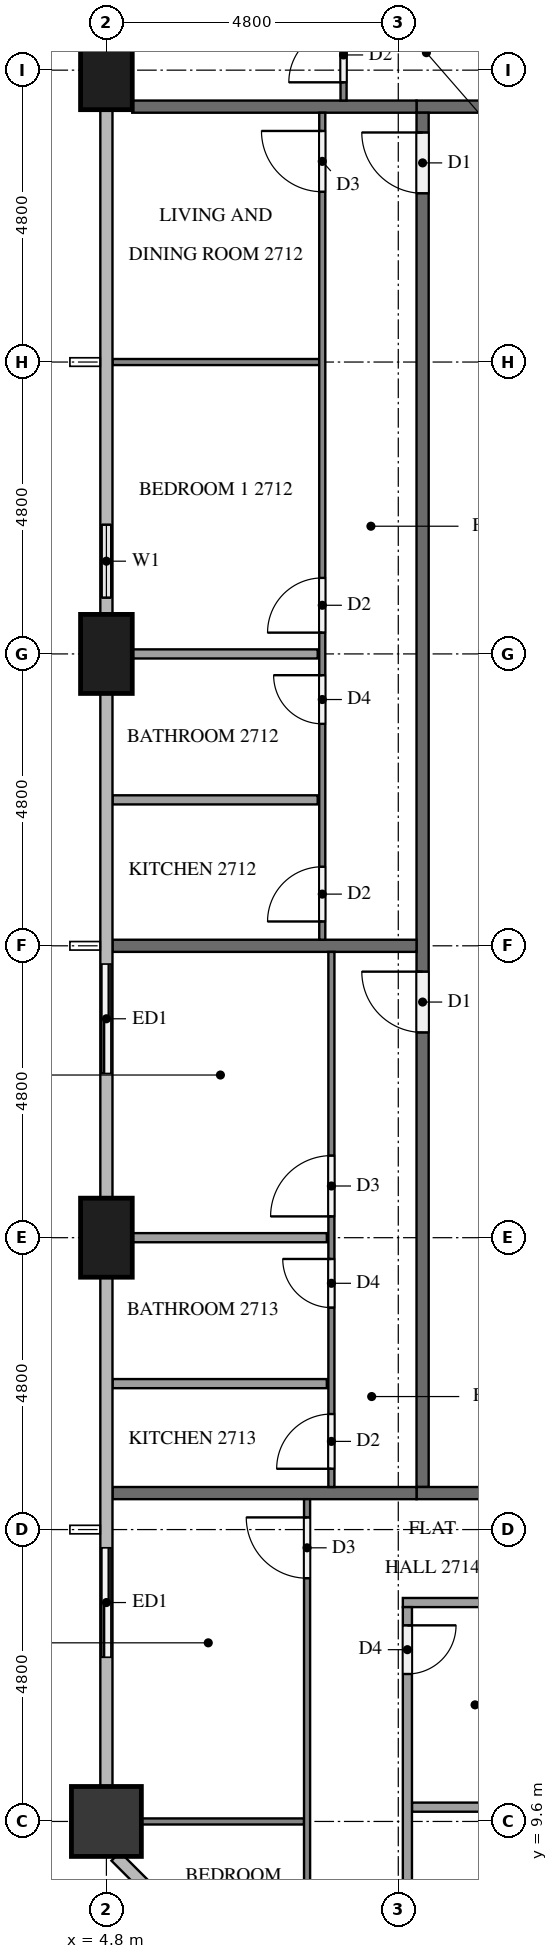
"""IFC4 building model, lengths in metres.
Left out: names, types, materials, properties, quantities, classifications, styles, units other than length and angle.
Written with IfcOpenShell. Run it as: python <this file> out.ifc"""

import sys

from ifc_helpers import new_model, si_unit, direction, frame, frame_2d, origin, origin_2d, place, context, subcontext, project, spatial, rectangle, extrude, element, fill, save


model = new_model("IFC4")
c1 = context("Model", 3, precision=1e-05, world=origin(), true_north=direction((0.0, 1.0)))
c2 = subcontext(c1, "Body", "Model", "MODEL_VIEW")
j1 = project(units=[si_unit("LENGTHUNIT", "METRE"), si_unit("PLANEANGLEUNIT", "RADIAN")], contexts=[c1])
p1 = place(None, origin())
s1 = spatial("IfcSite", under=j1, at=p1, CompositionType="ELEMENT")
p2 = place(p1, origin())
s2 = spatial("IfcBuilding", under=s1, at=p2, CompositionType="ELEMENT")
p3 = place(p2, frame((0.0, 0.0, 106.7)))
s3 = spatial("IfcBuildingStorey", under=s2, at=p3, CompositionType="ELEMENT", Elevation=106.7)
for number, where, z_axis, x_axis in (
    (1, (4.8, 38.4, 0.0), (0.0, 0.0, 1.0), (0.0, 1.0, 0.0)),
    (2, (4.8, 28.8, 0.0), (0.0, 0.0, 1.0), (0.0, 1.0, 0.0)),
    (3, (4.8, 19.2, 0.0), (0.0, 0.0, 1.0), (0.0, 1.0, 0.0)),
):
    element("IfcColumn", number, at=place(p3, frame(where, z_axis=z_axis, x_axis=x_axis)), inside=s3, PredefinedType="COLUMN", context=c2, shape_type="SweptSolid", body=[
        extrude(rectangle(XDim=1.3, YDim=0.85, at=origin_2d()), origin(), (0.0, 0.0, 1.0), 3.2),
    ])
p4 = place(p3, frame((4.8, 9.6, 0.0), z_axis=(0.0, 0.0, 1.0), x_axis=(1.0, 0.0, 0.0)))
e4 = element("IfcColumn", 4, at=p4, inside=s3, PredefinedType="COLUMN", context=c2, shape_type="SweptSolid", body=[
    extrude(rectangle(XDim=1.15, YDim=1.15, at=origin_2d()), origin(), (0.0, 0.0, 1.0), 3.2),
])
p5 = place(p3, frame((4.8, 31.2, 0.0), z_axis=(0.0, 0.0, 1.0), x_axis=(0.0, -1.0, 0.0)))
e5 = element("IfcWall", 5, at=p5, inside=s3, PredefinedType="SOLIDWALL", context=c2, shape_type="SweptSolid", body=[
    extrude(rectangle(XDim=1.75, YDim=0.15, at=frame_2d((0.875, 0.0))), origin(), (0.0, 0.0, 1.0), 3.2),
])
p6 = place(p5, frame((0.275, 0.0, 0.9)))
e6 = element("IfcOpeningElement", 6, at=p6, cuts=e5, PredefinedType="OPENING", context=c2, shape_type="SweptSolid", body=[
    extrude(rectangle(XDim=1.2, YDim=1.4, at=frame_2d((0.6, 0.7))), frame((0.0, 0.085, 0.0), z_axis=(0.0, -1.0, 0.0), x_axis=(1.0, 0.0, 0.0)), (0.0, 0.0, 1.0), 0.17),
])
p7 = place(p3, frame((4.8, 24.0, 0.0), z_axis=(0.0, 0.0, 1.0), x_axis=(0.0, -1.0, 0.0)))
e7 = element("IfcWall", 7, at=p7, inside=s3, PredefinedType="SOLIDWALL", context=c2, shape_type="SweptSolid", body=[
    extrude(rectangle(XDim=2.4, YDim=0.15, at=frame_2d((1.2, 0.0))), origin(), (0.0, 0.0, 1.0), 3.2),
])
p8 = place(p7, frame((0.3, 0.0, 0.0)))
e8 = element("IfcOpeningElement", 8, at=p8, cuts=e7, PredefinedType="OPENING", context=c2, shape_type="SweptSolid", body=[
    extrude(rectangle(XDim=1.8, YDim=2.4, at=frame_2d((0.9, 1.2))), frame((0.0, 0.085, 0.0), z_axis=(0.0, -1.0, 0.0), x_axis=(1.0, 0.0, 0.0)), (0.0, 0.0, 1.0), 0.17),
])
p9 = place(p3, frame((4.8, 14.4, 0.0), z_axis=(0.0, 0.0, 1.0), x_axis=(0.0, -1.0, 0.0)))
e9 = element("IfcWall", 9, at=p9, inside=s3, PredefinedType="SOLIDWALL", context=c2, shape_type="SweptSolid", body=[
    extrude(rectangle(XDim=2.4, YDim=0.15, at=frame_2d((1.2, 0.0))), origin(), (0.0, 0.0, 1.0), 3.2),
])
p10 = place(p9, frame((0.3, 0.0, 0.0)))
e10 = element("IfcOpeningElement", 10, at=p10, cuts=e9, PredefinedType="OPENING", context=c2, shape_type="SweptSolid", body=[
    extrude(rectangle(XDim=1.8, YDim=2.4, at=frame_2d((0.9, 1.2))), frame((0.0, 0.085, 0.0), z_axis=(0.0, -1.0, 0.0), x_axis=(1.0, 0.0, 0.0)), (0.0, 0.0, 1.0), 0.17),
])
p11 = place(p3, frame((12.1, 37.8, 0.0), z_axis=(0.0, 0.0, 1.0), x_axis=(-1.0, 0.0, 0.0)))
e11 = element("IfcWall", 11, at=p11, inside=s3, PredefinedType="PARTITIONING", context=c2, shape_type="SweptSolid", body=[
    extrude(rectangle(XDim=2.2, YDim=0.2, at=frame_2d((1.1, 0.0))), origin(), (0.0, 0.0, 1.0), 3.2),
])
p12 = place(p3, frame((10.0, 15.1, 0.0), z_axis=(0.0, 0.0, 1.0), x_axis=(0.0, 1.0, 0.0)))
e12 = element("IfcWall", 12, at=p12, inside=s3, PredefinedType="PARTITIONING", context=c2, shape_type="SweptSolid", body=[
    extrude(rectangle(XDim=22.6, YDim=0.2, at=frame_2d((11.3, 0.0))), origin(), (0.0, 0.0, 1.0), 3.2),
])
p13 = place(p12, frame((21.275, 0.0, 0.0)))
e13 = element("IfcOpeningElement", 13, at=p13, cuts=e12, PredefinedType="OPENING", context=c2, shape_type="SweptSolid", body=[
    extrude(rectangle(XDim=1.0, YDim=2.1, at=frame_2d((0.5, 1.05))), frame((0.0, 0.11, 0.0), z_axis=(0.0, -1.0, 0.0), x_axis=(1.0, 0.0, 0.0)), (0.0, 0.0, 1.0), 0.22),
])
p14 = place(p12, frame((7.475, 0.0, 0.0)))
e14 = element("IfcOpeningElement", 14, at=p14, cuts=e12, PredefinedType="OPENING", context=c2, shape_type="SweptSolid", body=[
    extrude(rectangle(XDim=1.0, YDim=2.1, at=frame_2d((0.5, 1.05))), frame((0.0, 0.11, 0.0), z_axis=(0.0, -1.0, 0.0), x_axis=(1.0, 0.0, 0.0)), (0.0, 0.0, 1.0), 0.22),
])
p15 = place(p3, frame((9.9, 15.0, 0.0), z_axis=(0.0, 0.0, 1.0), x_axis=(1.0, 0.0, 0.0)))
e15 = element("IfcWall", 15, at=p15, inside=s3, PredefinedType="PARTITIONING", context=c2, shape_type="SweptSolid", body=[
    extrude(rectangle(XDim=2.2, YDim=0.2, at=frame_2d((1.1, 0.0))), origin(), (0.0, 0.0, 1.0), 3.2),
])
p16 = place(p3, frame((5.225, 37.8, 0.0), z_axis=(0.0, 0.0, 1.0), x_axis=(1.0, 0.0, 0.0)))
e16 = element("IfcWall", 16, at=p16, inside=s3, PredefinedType="PARTITIONING", context=c2, shape_type="SweptSolid", body=[
    extrude(rectangle(XDim=4.675, YDim=0.2, at=frame_2d((2.337, 0.0))), origin(), (0.0, 0.0, 1.0), 3.2),
])
for number, where, z_axis, x_axis in (
    (17, (4.9, 24.0, 0.0), (0.0, 0.0, 1.0), (1.0, 0.0, 0.0)),
    (18, (4.9, 15.0, 0.0), (0.0, 0.0, 1.0), (1.0, 0.0, 0.0)),
):
    element("IfcWall", number, at=place(p3, frame(where, z_axis=z_axis, x_axis=x_axis)), inside=s3, PredefinedType="PARTITIONING", context=c2, shape_type="SweptSolid", body=[
        extrude(rectangle(XDim=5.0, YDim=0.2, at=frame_2d((2.5, 0.0))), origin(), (0.0, 0.0, 1.0), 3.2),
    ])
p17 = place(p3, frame((8.7, 37.9, 0.0), z_axis=(0.0, 0.0, 1.0), x_axis=(0.0, 1.0, 0.0)))
e19 = element("IfcWall", 19, at=p17, inside=s3, PredefinedType="PARTITIONING", context=c2, shape_type="SweptSolid", body=[
    extrude(rectangle(XDim=14.559, YDim=0.1, at=frame_2d((7.279, 0.0))), origin(), (0.0, 0.0, 1.0), 3.2),
])
p18 = place(p17, frame((0.3, 0.0, 0.0)))
e20 = element("IfcOpeningElement", 20, at=p18, cuts=e19, PredefinedType="OPENING", context=c2, shape_type="SweptSolid", body=[
    extrude(rectangle(XDim=0.9, YDim=2.1, at=frame_2d((0.45, 1.05))), frame((0.0, 0.06, 0.0), z_axis=(0.0, -1.0, 0.0), x_axis=(1.0, 0.0, 0.0)), (0.0, 0.0, 1.0), 0.12),
])
p19 = place(p17, frame((8.85, 0.0, 0.0)))
e21 = element("IfcOpeningElement", 21, at=p19, cuts=e19, PredefinedType="OPENING", context=c2, shape_type="SweptSolid", body=[
    extrude(rectangle(XDim=0.9, YDim=2.1, at=frame_2d((0.45, 1.05))), frame((0.0, 0.06, 0.0), z_axis=(0.0, -1.0, 0.0), x_axis=(1.0, 0.0, 0.0)), (0.0, 0.0, 1.0), 0.12),
])
p20 = place(p17, frame((10.45, 0.0, 0.0)))
e22 = element("IfcOpeningElement", 22, at=p20, cuts=e19, PredefinedType="OPENING", context=c2, shape_type="SweptSolid", body=[
    extrude(rectangle(XDim=1.0, YDim=2.1, at=frame_2d((0.5, 1.05))), frame((0.0, 0.06, 0.0), z_axis=(0.0, -1.0, 0.0), x_axis=(1.0, 0.0, 0.0)), (0.0, 0.0, 1.0), 0.12),
])
p21 = place(p3, frame((8.3, 33.6, 0.0), z_axis=(0.0, 0.0, 1.0), x_axis=(-1.0, 0.0, 0.0)))
e23 = element("IfcWall", 23, at=p21, inside=s3, PredefinedType="PARTITIONING", context=c2, shape_type="SweptSolid", body=[
    extrude(rectangle(XDim=3.4, YDim=0.1, at=frame_2d((1.7, 0.0))), origin(), (0.0, 0.0, 1.0), 3.2),
])
p22 = place(p3, frame((8.275, 28.8, 0.0), z_axis=(0.0, 0.0, 1.0), x_axis=(-1.0, 0.0, 0.0)))
e24 = element("IfcWall", 24, at=p22, inside=s3, PredefinedType="PARTITIONING", context=c2, shape_type="SweptSolid", body=[
    extrude(rectangle(XDim=3.05, YDim=0.15, at=frame_2d((1.525, 0.0))), origin(), (0.0, 0.0, 1.0), 3.2),
])
p23 = place(p3, frame((8.275, 26.4, 0.0), z_axis=(0.0, 0.0, 1.0), x_axis=(-1.0, 0.0, 0.0)))
e25 = element("IfcWall", 25, at=p23, inside=s3, PredefinedType="PARTITIONING", context=c2, shape_type="SweptSolid", body=[
    extrude(rectangle(XDim=3.375, YDim=0.15, at=frame_2d((1.688, 0.0))), origin(), (0.0, 0.0, 1.0), 3.2),
])
p24 = place(p3, frame((8.35, 24.1, 0.0), z_axis=(0.0, 0.0, 1.0), x_axis=(0.0, 1.0, 0.0)))
e26 = element("IfcWall", 26, at=p24, inside=s3, PredefinedType="PARTITIONING", context=c2, shape_type="SweptSolid", body=[
    extrude(rectangle(XDim=13.6, YDim=0.1, at=frame_2d((6.8, 0.0))), origin(), (0.0, 0.0, 1.0), 3.2),
])
p25 = place(p24, frame((12.3, 0.0, 0.0)))
e27 = element("IfcOpeningElement", 27, at=p25, cuts=e26, PredefinedType="OPENING", context=c2, shape_type="SweptSolid", body=[
    extrude(rectangle(XDim=1.0, YDim=2.1, at=frame_2d((0.5, 1.05))), frame((0.0, 0.06, 0.0), z_axis=(0.0, -1.0, 0.0), x_axis=(1.0, 0.0, 0.0)), (0.0, 0.0, 1.0), 0.12),
])
p26 = place(p24, frame((5.05, 0.0, 0.0)))
e28 = element("IfcOpeningElement", 28, at=p26, cuts=e26, PredefinedType="OPENING", context=c2, shape_type="SweptSolid", body=[
    extrude(rectangle(XDim=0.9, YDim=2.1, at=frame_2d((0.45, 1.05))), frame((0.0, 0.06, 0.0), z_axis=(0.0, -1.0, 0.0), x_axis=(1.0, 0.0, 0.0)), (0.0, 0.0, 1.0), 0.12),
])
p27 = place(p24, frame((3.55, 0.0, 0.0)))
e29 = element("IfcOpeningElement", 29, at=p27, cuts=e26, PredefinedType="OPENING", context=c2, shape_type="SweptSolid", body=[
    extrude(rectangle(XDim=0.8, YDim=2.1, at=frame_2d((0.4, 1.05))), frame((0.0, 0.06, 0.0), z_axis=(0.0, -1.0, 0.0), x_axis=(1.0, 0.0, 0.0)), (0.0, 0.0, 1.0), 0.12),
])
p28 = place(p24, frame((0.3, 0.0, 0.0)))
e30 = element("IfcOpeningElement", 30, at=p28, cuts=e26, PredefinedType="OPENING", context=c2, shape_type="SweptSolid", body=[
    extrude(rectangle(XDim=0.9, YDim=2.1, at=frame_2d((0.45, 1.05))), frame((0.0, 0.06, 0.0), z_axis=(0.0, -1.0, 0.0), x_axis=(1.0, 0.0, 0.0)), (0.0, 0.0, 1.0), 0.12),
])
p29 = place(p3, frame((8.425, 19.2, 0.0), z_axis=(0.0, 0.0, 1.0), x_axis=(-1.0, 0.0, 0.0)))
e31 = element("IfcWall", 31, at=p29, inside=s3, PredefinedType="PARTITIONING", context=c2, shape_type="SweptSolid", body=[
    extrude(rectangle(XDim=3.2, YDim=0.15, at=frame_2d((1.6, 0.0))), origin(), (0.0, 0.0, 1.0), 3.2),
])
p30 = place(p3, frame((8.425, 16.8, 0.0), z_axis=(0.0, 0.0, 1.0), x_axis=(-1.0, 0.0, 0.0)))
e32 = element("IfcWall", 32, at=p30, inside=s3, PredefinedType="PARTITIONING", context=c2, shape_type="SweptSolid", body=[
    extrude(rectangle(XDim=3.525, YDim=0.15, at=frame_2d((1.763, 0.0))), origin(), (0.0, 0.0, 1.0), 3.2),
])
p31 = place(p3, frame((8.5, 15.1, 0.0), z_axis=(0.0, 0.0, 1.0), x_axis=(0.0, 1.0, 0.0)))
e33 = element("IfcWall", 33, at=p31, inside=s3, PredefinedType="PARTITIONING", context=c2, shape_type="SweptSolid", body=[
    extrude(rectangle(XDim=8.8, YDim=0.1, at=frame_2d((4.4, 0.0))), origin(), (0.0, 0.0, 1.0), 3.2),
])
p32 = place(p31, frame((4.45, 0.0, 0.0)))
e34 = element("IfcOpeningElement", 34, at=p32, cuts=e33, PredefinedType="OPENING", context=c2, shape_type="SweptSolid", body=[
    extrude(rectangle(XDim=1.0, YDim=2.1, at=frame_2d((0.5, 1.05))), frame((0.0, 0.06, 0.0), z_axis=(0.0, -1.0, 0.0), x_axis=(1.0, 0.0, 0.0)), (0.0, 0.0, 1.0), 0.12),
])
p33 = place(p31, frame((2.95, 0.0, 0.0)))
e35 = element("IfcOpeningElement", 35, at=p33, cuts=e33, PredefinedType="OPENING", context=c2, shape_type="SweptSolid", body=[
    extrude(rectangle(XDim=0.8, YDim=2.1, at=frame_2d((0.4, 1.05))), frame((0.0, 0.06, 0.0), z_axis=(0.0, -1.0, 0.0), x_axis=(1.0, 0.0, 0.0)), (0.0, 0.0, 1.0), 0.12),
])
p34 = place(p31, frame((0.3, 0.0, 0.0)))
e36 = element("IfcOpeningElement", 36, at=p34, cuts=e33, PredefinedType="OPENING", context=c2, shape_type="SweptSolid", body=[
    extrude(rectangle(XDim=0.9, YDim=2.1, at=frame_2d((0.45, 1.05))), frame((0.0, 0.06, 0.0), z_axis=(0.0, -1.0, 0.0), x_axis=(1.0, 0.0, 0.0)), (0.0, 0.0, 1.0), 0.12),
])
p35 = place(p3, frame((8.05, 9.6, 0.0), z_axis=(0.0, 0.0, 1.0), x_axis=(-1.0, 0.0, 0.0)))
e37 = element("IfcWall", 37, at=p35, inside=s3, PredefinedType="PARTITIONING", context=c2, shape_type="SweptSolid", body=[
    extrude(rectangle(XDim=2.675, YDim=0.1, at=frame_2d((1.337, 0.0))), origin(), (0.0, 0.0, 1.0), 3.2),
])
p36 = place(p3, frame((8.1, 5.302, 0.0), z_axis=(0.0, 0.0, 1.0), x_axis=(0.0, 1.0, 0.0)))
e38 = element("IfcWall", 38, at=p36, inside=s3, PredefinedType="PARTITIONING", context=c2, shape_type="SweptSolid", body=[
    extrude(rectangle(XDim=9.598, YDim=0.1, at=frame_2d((4.799, 0.0))), origin(), (0.0, 0.0, 1.0), 3.2),
])
p37 = place(p36, frame((8.298, 0.0, 0.0)))
e39 = element("IfcOpeningElement", 39, at=p37, cuts=e38, PredefinedType="OPENING", context=c2, shape_type="SweptSolid", body=[
    extrude(rectangle(XDim=1.0, YDim=2.1, at=frame_2d((0.5, 1.05))), frame((0.0, 0.06, 0.0), z_axis=(0.0, -1.0, 0.0), x_axis=(1.0, 0.0, 0.0)), (0.0, 0.0, 1.0), 0.12),
])
p38 = place(p36, frame((0.3, 0.0, 0.0)))
e40 = element("IfcOpeningElement", 40, at=p38, cuts=e38, PredefinedType="OPENING", context=c2, shape_type="SweptSolid", body=[
    extrude(rectangle(XDim=0.9, YDim=2.1, at=frame_2d((0.45, 1.05))), frame((0.0, 0.06, 0.0), z_axis=(0.0, -1.0, 0.0), x_axis=(1.0, 0.0, 0.0)), (0.0, 0.0, 1.0), 0.12),
])
p39 = place(p3, frame((11.9, 9.835, 0.0), z_axis=(0.0, 0.0, 1.0), x_axis=(-1.0, 0.0, 0.0)))
e41 = element("IfcWall", 41, at=p39, inside=s3, PredefinedType="PARTITIONING", context=c2, shape_type="SweptSolid", body=[
    extrude(rectangle(XDim=2.075, YDim=0.15, at=frame_2d((1.038, 0.0))), origin(), (0.0, 0.0, 1.0), 3.2),
])
p40 = place(p3, frame((11.9, 13.2, 0.0), z_axis=(0.0, 0.0, 1.0), x_axis=(-1.0, 0.0, 0.0)))
e42 = element("IfcWall", 42, at=p40, inside=s3, PredefinedType="PARTITIONING", context=c2, shape_type="SweptSolid", body=[
    extrude(rectangle(XDim=2.225, YDim=0.15, at=frame_2d((1.112, 0.0))), origin(), (0.0, 0.0, 1.0), 3.2),
])
p41 = place(p3, frame((9.75, 13.125, 0.0), z_axis=(0.0, 0.0, 1.0), x_axis=(0.0, -1.0, 0.0)))
e43 = element("IfcWall", 43, at=p41, inside=s3, PredefinedType="PARTITIONING", context=c2, shape_type="SweptSolid", body=[
    extrude(rectangle(XDim=7.75, YDim=0.15, at=frame_2d((3.875, 0.0))), origin(), (0.0, 0.0, 1.0), 3.2),
])
p42 = place(p41, frame((0.3, 0.0, 0.0)))
e44 = element("IfcOpeningElement", 44, at=p42, cuts=e43, PredefinedType="OPENING", context=c2, shape_type="SweptSolid", body=[
    extrude(rectangle(XDim=0.8, YDim=2.1, at=frame_2d((0.4, 1.05))), frame((0.0, 0.085, 0.0), z_axis=(0.0, -1.0, 0.0), x_axis=(1.0, 0.0, 0.0)), (0.0, 0.0, 1.0), 0.17),
])
p43 = place(p41, frame((6.55, 0.0, 0.0)))
e45 = element("IfcOpeningElement", 45, at=p43, cuts=e43, PredefinedType="OPENING", context=c2, shape_type="SweptSolid", body=[
    extrude(rectangle(XDim=0.9, YDim=2.1, at=frame_2d((0.45, 1.05))), frame((0.0, 0.085, 0.0), z_axis=(0.0, -1.0, 0.0), x_axis=(1.0, 0.0, 0.0)), (0.0, 0.0, 1.0), 0.17),
])
p44 = place(p6, origin())
e46 = element("IfcWindow", 46, at=p44, inside=s3, PartitioningType="SINGLE_PANEL", PredefinedType="WINDOW", context=c2, shape_type="SweptSolid", body=[
    extrude(rectangle(XDim=1.2, YDim=1.4, at=frame_2d((0.6, 0.7))), frame((0.0, 0.03, 0.0), z_axis=(0.0, -1.0, 0.0), x_axis=(1.0, 0.0, 0.0)), (0.0, 0.0, 1.0), 0.06),
])
fill(e6, e46)
p45 = place(p8, origin())
e47 = element("IfcDoor", 47, at=p45, inside=s3, OperationType="SLIDING_TO_LEFT", PredefinedType="DOOR", context=c2, shape_type="SweptSolid", body=[
    extrude(rectangle(XDim=1.8, YDim=2.4, at=frame_2d((0.9, 1.2))), frame((0.0, 0.025, 0.0), z_axis=(0.0, -1.0, 0.0), x_axis=(1.0, 0.0, 0.0)), (0.0, 0.0, 1.0), 0.05),
])
fill(e8, e47)
p46 = place(p10, origin())
e48 = element("IfcDoor", 48, at=p46, inside=s3, OperationType="SLIDING_TO_RIGHT", PredefinedType="DOOR", context=c2, shape_type="SweptSolid", body=[
    extrude(rectangle(XDim=1.8, YDim=2.4, at=frame_2d((0.9, 1.2))), frame((0.0, 0.025, 0.0), z_axis=(0.0, -1.0, 0.0), x_axis=(1.0, 0.0, 0.0)), (0.0, 0.0, 1.0), 0.05),
])
fill(e10, e48)
p47 = place(p13, origin())
e49 = element("IfcDoor", 49, at=p47, inside=s3, OperationType="SINGLE_SWING_RIGHT", PredefinedType="DOOR", context=c2, shape_type="SweptSolid", body=[
    extrude(rectangle(XDim=1.0, YDim=2.1, at=frame_2d((0.5, 1.05))), frame((0.0, 0.025, 0.0), z_axis=(0.0, -1.0, 0.0), x_axis=(1.0, 0.0, 0.0)), (0.0, 0.0, 1.0), 0.05),
])
fill(e13, e49)
p48 = place(p14, origin())
e50 = element("IfcDoor", 50, at=p48, inside=s3, OperationType="SINGLE_SWING_RIGHT", PredefinedType="DOOR", context=c2, shape_type="SweptSolid", body=[
    extrude(rectangle(XDim=1.0, YDim=2.1, at=frame_2d((0.5, 1.05))), frame((0.0, 0.025, 0.0), z_axis=(0.0, -1.0, 0.0), x_axis=(1.0, 0.0, 0.0)), (0.0, 0.0, 1.0), 0.05),
])
fill(e14, e50)
p49 = place(p18, origin())
e51 = element("IfcDoor", 51, at=p49, inside=s3, OperationType="SINGLE_SWING_LEFT", PredefinedType="DOOR", context=c2, shape_type="SweptSolid", body=[
    extrude(rectangle(XDim=0.9, YDim=2.1, at=frame_2d((0.45, 1.05))), frame((0.0, 0.025, 0.0), z_axis=(0.0, -1.0, 0.0), x_axis=(1.0, 0.0, 0.0)), (0.0, 0.0, 1.0), 0.05),
])
fill(e20, e51)
p50 = place(p25, origin())
e52 = element("IfcDoor", 52, at=p50, inside=s3, OperationType="SINGLE_SWING_RIGHT", PredefinedType="DOOR", context=c2, shape_type="SweptSolid", body=[
    extrude(rectangle(XDim=1.0, YDim=2.1, at=frame_2d((0.5, 1.05))), frame((0.0, 0.025, 0.0), z_axis=(0.0, -1.0, 0.0), x_axis=(1.0, 0.0, 0.0)), (0.0, 0.0, 1.0), 0.05),
])
fill(e27, e52)
p51 = place(p26, origin())
e53 = element("IfcDoor", 53, at=p51, inside=s3, OperationType="SINGLE_SWING_LEFT", PredefinedType="DOOR", context=c2, shape_type="SweptSolid", body=[
    extrude(rectangle(XDim=0.9, YDim=2.1, at=frame_2d((0.45, 1.05))), frame((0.0, 0.025, 0.0), z_axis=(0.0, -1.0, 0.0), x_axis=(1.0, 0.0, 0.0)), (0.0, 0.0, 1.0), 0.05),
])
fill(e28, e53)
p52 = place(p27, origin())
e54 = element("IfcDoor", 54, at=p52, inside=s3, OperationType="SINGLE_SWING_RIGHT", PredefinedType="DOOR", context=c2, shape_type="SweptSolid", body=[
    extrude(rectangle(XDim=0.8, YDim=2.1, at=frame_2d((0.4, 1.05))), frame((0.0, 0.025, 0.0), z_axis=(0.0, -1.0, 0.0), x_axis=(1.0, 0.0, 0.0)), (0.0, 0.0, 1.0), 0.05),
])
fill(e29, e54)
p53 = place(p28, origin())
e55 = element("IfcDoor", 55, at=p53, inside=s3, OperationType="SINGLE_SWING_LEFT", PredefinedType="DOOR", context=c2, shape_type="SweptSolid", body=[
    extrude(rectangle(XDim=0.9, YDim=2.1, at=frame_2d((0.45, 1.05))), frame((0.0, 0.025, 0.0), z_axis=(0.0, -1.0, 0.0), x_axis=(1.0, 0.0, 0.0)), (0.0, 0.0, 1.0), 0.05),
])
fill(e30, e55)
p54 = place(p32, origin())
e56 = element("IfcDoor", 56, at=p54, inside=s3, OperationType="SINGLE_SWING_LEFT", PredefinedType="DOOR", context=c2, shape_type="SweptSolid", body=[
    extrude(rectangle(XDim=1.0, YDim=2.1, at=frame_2d((0.5, 1.05))), frame((0.0, 0.025, 0.0), z_axis=(0.0, -1.0, 0.0), x_axis=(1.0, 0.0, 0.0)), (0.0, 0.0, 1.0), 0.05),
])
fill(e34, e56)
p55 = place(p33, origin())
e57 = element("IfcDoor", 57, at=p55, inside=s3, OperationType="SINGLE_SWING_RIGHT", PredefinedType="DOOR", context=c2, shape_type="SweptSolid", body=[
    extrude(rectangle(XDim=0.8, YDim=2.1, at=frame_2d((0.4, 1.05))), frame((0.0, 0.025, 0.0), z_axis=(0.0, -1.0, 0.0), x_axis=(1.0, 0.0, 0.0)), (0.0, 0.0, 1.0), 0.05),
])
fill(e35, e57)
p56 = place(p34, origin())
e58 = element("IfcDoor", 58, at=p56, inside=s3, OperationType="SINGLE_SWING_LEFT", PredefinedType="DOOR", context=c2, shape_type="SweptSolid", body=[
    extrude(rectangle(XDim=0.9, YDim=2.1, at=frame_2d((0.45, 1.05))), frame((0.0, 0.025, 0.0), z_axis=(0.0, -1.0, 0.0), x_axis=(1.0, 0.0, 0.0)), (0.0, 0.0, 1.0), 0.05),
])
fill(e36, e58)
p57 = place(p37, origin())
e59 = element("IfcDoor", 59, at=p57, inside=s3, OperationType="SINGLE_SWING_RIGHT", PredefinedType="DOOR", context=c2, shape_type="SweptSolid", body=[
    extrude(rectangle(XDim=1.0, YDim=2.1, at=frame_2d((0.5, 1.05))), frame((0.0, 0.025, 0.0), z_axis=(0.0, -1.0, 0.0), x_axis=(1.0, 0.0, 0.0)), (0.0, 0.0, 1.0), 0.05),
])
fill(e39, e59)
p58 = place(p42, origin())
e60 = element("IfcDoor", 60, at=p58, inside=s3, OperationType="SINGLE_SWING_LEFT", PredefinedType="DOOR", context=c2, shape_type="SweptSolid", body=[
    extrude(rectangle(XDim=0.8, YDim=2.1, at=frame_2d((0.4, 1.05))), frame((0.0, 0.025, 0.0), z_axis=(0.0, -1.0, 0.0), x_axis=(1.0, 0.0, 0.0)), (0.0, 0.0, 1.0), 0.05),
])
fill(e44, e60)
save(model, sys.argv[1])
